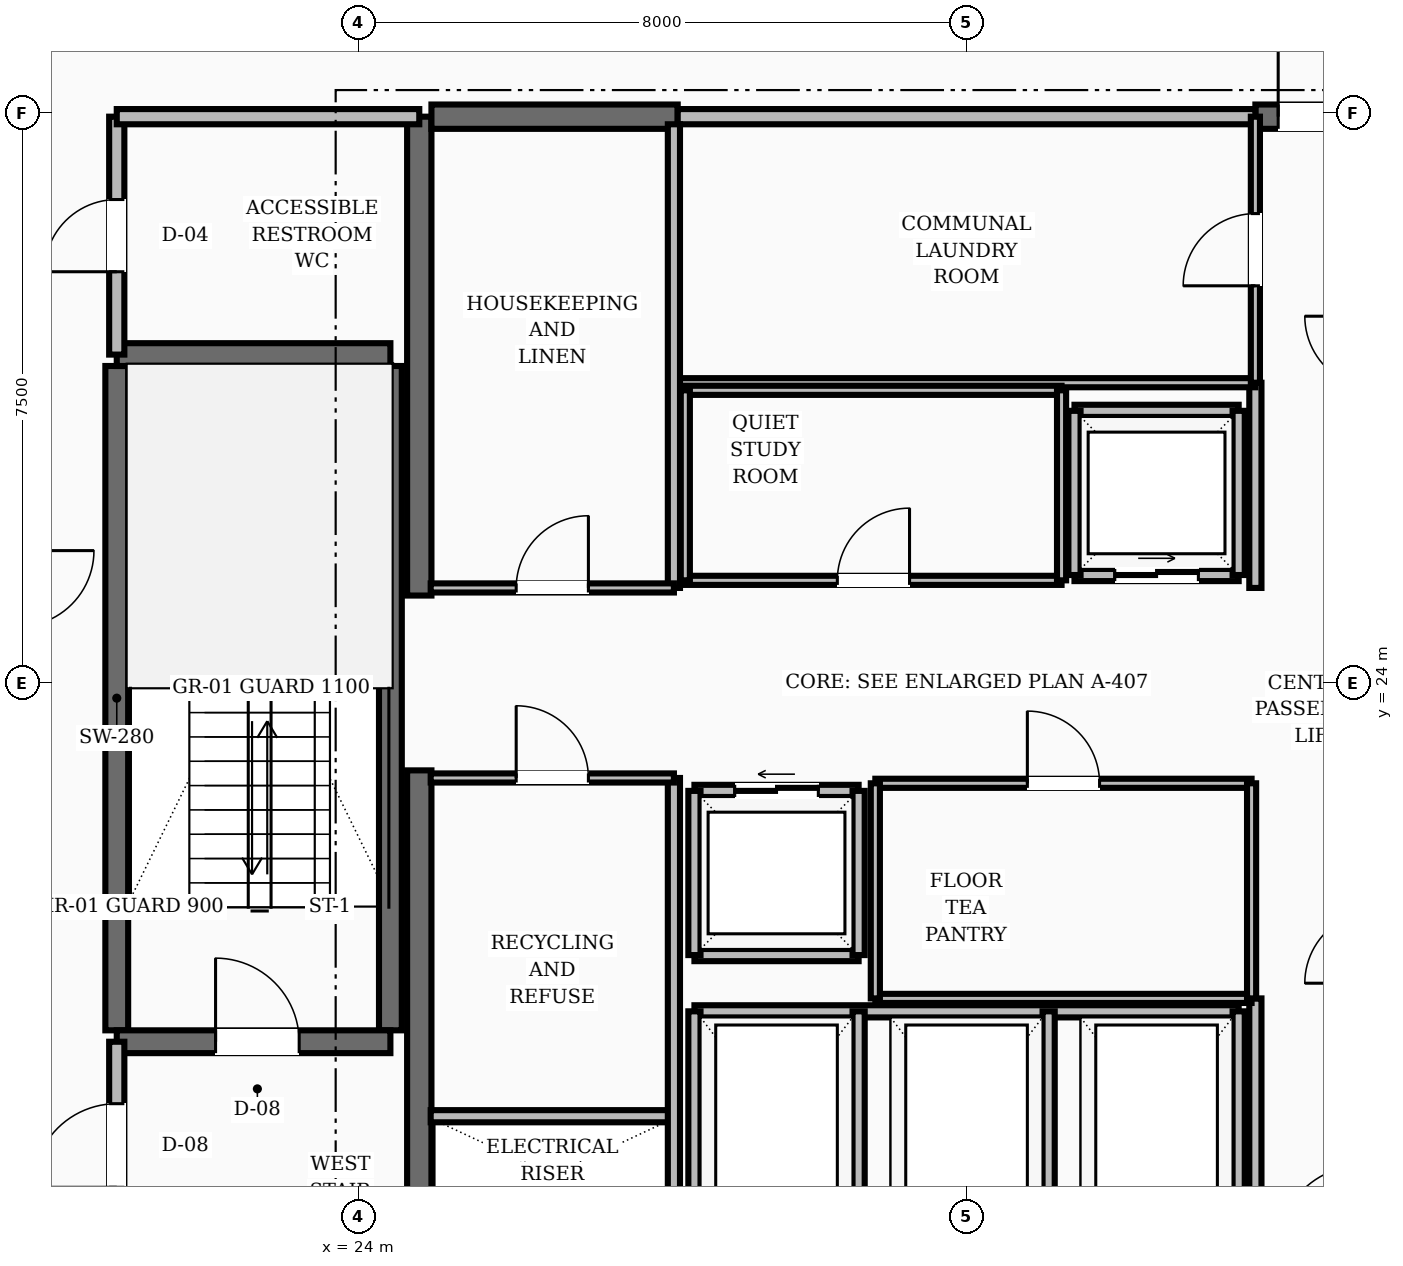
"""IFC4 building model, lengths in metres.
Left out: names, types, materials, properties, quantities, classifications, styles, units other than length and angle.
Written with IfcOpenShell. Run it as: python <this file> out.ifc"""

import sys

from ifc_helpers import new_model, si_unit, direction, frame, frame_2d, origin, place, context, subcontext, project, spatial, rectangle, extrude, element, fill, save


model = new_model("IFC4")
c1 = context("Model", 3, precision=1e-05, world=origin(), true_north=direction((0.0, 1.0)))
c2 = subcontext(c1, "Body", "Model", "MODEL_VIEW")
j1 = project(units=[si_unit("LENGTHUNIT", "METRE"), si_unit("PLANEANGLEUNIT", "RADIAN")], contexts=[c1])
p1 = place(None, origin())
s1 = spatial("IfcSite", under=j1, at=p1, CompositionType="ELEMENT")
p2 = place(p1, origin())
s2 = spatial("IfcBuilding", under=s1, at=p2, CompositionType="ELEMENT")
p3 = place(p2, frame((0.0, 0.0, 232.8)))
s3 = spatial("IfcBuildingStorey", under=s2, at=p3, CompositionType="ELEMENT", Elevation=232.8)
for number, where, z_axis, x_axis in (
    (1, (24.8, 16.55, 0.0), (0.0, 0.0, 1.0), (0.0, 1.0, 0.0)),
    (2, (24.8, 25.15, 0.0), (0.0, 0.0, 1.0), (0.0, 1.0, 0.0)),
):
    element("IfcWall", number, at=place(p3, frame(where, z_axis=z_axis, x_axis=x_axis)), inside=s3, PredefinedType="SHEAR", context=c2, shape_type="SweptSolid", body=[
        extrude(rectangle(XDim=6.3, YDim=0.32, at=frame_2d((3.15, 0.0))), origin(), (0.0, 0.0, 1.0), 3.6),
    ])
p4 = place(p3, frame((24.96, 31.45, 0.0), z_axis=(0.0, 0.0, 1.0), x_axis=(1.0, 0.0, 0.0)))
e3 = element("IfcWall", 3, at=p4, inside=s3, PredefinedType="SHEAR", context=c2, shape_type="SweptSolid", body=[
    extrude(rectangle(XDim=3.24, YDim=0.32, at=frame_2d((1.62, 0.0))), origin(), (0.0, 0.0, 1.0), 3.6),
])
p5 = place(p3, frame((35.8, 31.45, 0.0), z_axis=(0.0, 0.0, 1.0), x_axis=(1.0, 0.0, 0.0)))
e4 = element("IfcWall", 4, at=p5, inside=s3, PredefinedType="SHEAR", context=c2, shape_type="SweptSolid", body=[
    extrude(rectangle(XDim=3.24, YDim=0.32, at=frame_2d((1.62, 0.0))), origin(), (0.0, 0.0, 1.0), 3.6),
])
p6 = place(p5, frame((0.3, 0.0, 0.0)))
e5 = element("IfcOpeningElement", 5, at=p6, cuts=e4, PredefinedType="OPENING", context=c2, shape_type="SweptSolid", body=[
    extrude(rectangle(XDim=1.1, YDim=2.1, at=frame_2d((0.55, 1.05))), frame((0.0, 0.17, 0.0), z_axis=(0.0, -1.0, 0.0), x_axis=(1.0, 0.0, 0.0)), (0.0, 0.0, 1.0), 0.34),
])
for number, where, z_axis, x_axis in (
    (6, (20.82, 19.43, 0.0), (0.0, 0.0, 1.0), (0.0, 1.0, 0.0)),
    (7, (24.42, 19.43, 0.0), (0.0, 0.0, 1.0), (0.0, 1.0, 0.0)),
):
    element("IfcWall", number, at=place(p3, frame(where, z_axis=z_axis, x_axis=x_axis)), inside=s3, PredefinedType="SHEAR", context=c2, shape_type="SweptSolid", body=[
        extrude(rectangle(XDim=8.74, YDim=0.3, at=frame_2d((4.37, 0.0))), origin(), (0.0, 0.0, 1.0), 3.6),
    ])
p7 = place(p3, frame((20.82, 19.28, 0.0), z_axis=(0.0, 0.0, 1.0), x_axis=(1.0, 0.0, 0.0)))
e8 = element("IfcWall", 8, at=p7, inside=s3, PredefinedType="SHEAR", context=c2, shape_type="SweptSolid", body=[
    extrude(rectangle(XDim=3.6, YDim=0.3, at=frame_2d((1.8, 0.0))), origin(), (0.0, 0.0, 1.0), 3.6),
])
p8 = place(p7, frame((1.3, 0.0, 0.0)))
e9 = element("IfcOpeningElement", 9, at=p8, cuts=e8, PredefinedType="OPENING", context=c2, shape_type="SweptSolid", body=[
    extrude(rectangle(XDim=1.1, YDim=2.1, at=frame_2d((0.55, 1.05))), frame((0.0, 0.16, 0.0), z_axis=(0.0, -1.0, 0.0), x_axis=(1.0, 0.0, 0.0)), (0.0, 0.0, 1.0), 0.32),
])
p9 = place(p3, frame((20.82, 28.32, 0.0), z_axis=(0.0, 0.0, 1.0), x_axis=(1.0, 0.0, 0.0)))
e10 = element("IfcWall", 10, at=p9, inside=s3, PredefinedType="SHEAR", context=c2, shape_type="SweptSolid", body=[
    extrude(rectangle(XDim=3.6, YDim=0.3, at=frame_2d((1.8, 0.0))), origin(), (0.0, 0.0, 1.0), 3.6),
])
p10 = place(p3, frame((20.82, 16.55, 0.0), z_axis=(0.0, 0.0, 1.0), x_axis=(0.0, 1.0, 0.0)))
e11 = element("IfcWall", 11, at=p10, inside=s3, PredefinedType="SOLIDWALL", context=c2, shape_type="SweptSolid", body=[
    extrude(rectangle(XDim=2.73, YDim=0.2, at=frame_2d((1.365, 0.0))), origin(), (0.0, 0.0, 1.0), 2.87),
])
p11 = place(p10, frame((0.815, 0.0, 0.0)))
e12 = element("IfcOpeningElement", 12, at=p11, cuts=e11, PredefinedType="OPENING", context=c2, shape_type="SweptSolid", body=[
    extrude(rectangle(XDim=1.1, YDim=2.1, at=frame_2d((0.55, 1.05))), frame((0.0, 0.11, 0.0), z_axis=(0.0, -1.0, 0.0), x_axis=(1.0, 0.0, 0.0)), (0.0, 0.0, 1.0), 0.22),
])
p12 = place(p3, frame((20.82, 28.32, 0.0), z_axis=(0.0, 0.0, 1.0), x_axis=(0.0, 1.0, 0.0)))
e13 = element("IfcWall", 13, at=p12, inside=s3, PredefinedType="SOLIDWALL", context=c2, shape_type="SweptSolid", body=[
    extrude(rectangle(XDim=3.13, YDim=0.2, at=frame_2d((1.565, 0.0))), origin(), (0.0, 0.0, 1.0), 2.87),
])
p13 = place(p12, frame((1.09, 0.0, 0.0)))
e14 = element("IfcOpeningElement", 14, at=p13, cuts=e13, PredefinedType="OPENING", context=c2, shape_type="SweptSolid", body=[
    extrude(rectangle(XDim=0.95, YDim=2.1, at=frame_2d((0.475, 1.05))), frame((0.0, 0.11, 0.0), z_axis=(0.0, -1.0, 0.0), x_axis=(1.0, 0.0, 0.0)), (0.0, 0.0, 1.0), 0.22),
])
p14 = place(p3, frame((20.82, 31.45, 0.0), z_axis=(0.0, 0.0, 1.0), x_axis=(1.0, 0.0, 0.0)))
e15 = element("IfcWall", 15, at=p14, inside=s3, PredefinedType="SOLIDWALL", context=c2, shape_type="SweptSolid", body=[
    extrude(rectangle(XDim=3.98, YDim=0.2, at=frame_2d((1.99, 0.0))), origin(), (0.0, 0.0, 1.0), 2.87),
])
p15 = place(p3, frame((35.8, 16.55, 0.0), z_axis=(0.0, 0.0, 1.0), x_axis=(0.0, 1.0, 0.0)))
e16 = element("IfcWall", 16, at=p15, inside=s3, PredefinedType="SOLIDWALL", context=c2, shape_type="SweptSolid", body=[
    extrude(rectangle(XDim=3.3, YDim=0.16, at=frame_2d((1.65, 0.0))), origin(), (0.0, 0.0, 1.0), 2.87),
])
p16 = place(p3, frame((35.8, 25.25, 0.0), z_axis=(0.0, 0.0, 1.0), x_axis=(0.0, 1.0, 0.0)))
e17 = element("IfcWall", 17, at=p16, inside=s3, PredefinedType="SOLIDWALL", context=c2, shape_type="SweptSolid", body=[
    extrude(rectangle(XDim=2.7, YDim=0.16, at=frame_2d((1.35, 0.0))), origin(), (0.0, 0.0, 1.0), 2.87),
])
p17 = place(p3, frame((33.42, 25.42, 0.0), z_axis=(0.0, 0.0, 1.0), x_axis=(1.0, 0.0, 0.0)))
e18 = element("IfcWall", 18, at=p17, inside=s3, PredefinedType="SOLIDWALL", context=c2, shape_type="SweptSolid", body=[
    extrude(rectangle(XDim=2.16, YDim=0.16, at=frame_2d((1.08, 0.0))), origin(), (0.0, 0.0, 1.0), 2.87),
])
p18 = place(p17, frame((0.53, 0.0, 0.0)))
e19 = element("IfcOpeningElement", 19, at=p18, cuts=e18, PredefinedType="OPENING", context=c2, shape_type="SweptSolid", body=[
    extrude(rectangle(XDim=1.1, YDim=2.15, at=frame_2d((0.55, 1.075))), frame((0.0, 0.09, 0.0), z_axis=(0.0, -1.0, 0.0), x_axis=(1.0, 0.0, 0.0)), (0.0, 0.0, 1.0), 0.18),
])
for number, where, z_axis, x_axis in (
    (20, (33.42, 27.58, 0.0), (0.0, 0.0, 1.0), (1.0, 0.0, 0.0)),
    (21, (33.42, 25.42, 0.0), (0.0, 0.0, 1.0), (0.0, 1.0, 0.0)),
    (22, (35.58, 25.42, 0.0), (0.0, 0.0, 1.0), (0.0, 1.0, 0.0)),
):
    element("IfcWall", number, at=place(p3, frame(where, z_axis=z_axis, x_axis=x_axis)), inside=s3, PredefinedType="SOLIDWALL", context=c2, shape_type="SweptSolid", body=[
        extrude(rectangle(XDim=2.16, YDim=0.16, at=frame_2d((1.08, 0.0))), origin(), (0.0, 0.0, 1.0), 2.87),
    ])
p19 = place(p3, frame((28.42, 22.58, 0.0), z_axis=(0.0, 0.0, 1.0), x_axis=(1.0, 0.0, 0.0)))
e23 = element("IfcWall", 23, at=p19, inside=s3, PredefinedType="SOLIDWALL", context=c2, shape_type="SweptSolid", body=[
    extrude(rectangle(XDim=2.16, YDim=0.16, at=frame_2d((1.08, 0.0))), origin(), (0.0, 0.0, 1.0), 2.87),
])
p20 = place(p19, frame((0.53, 0.0, 0.0)))
e24 = element("IfcOpeningElement", 24, at=p20, cuts=e23, PredefinedType="OPENING", context=c2, shape_type="SweptSolid", body=[
    extrude(rectangle(XDim=1.1, YDim=2.15, at=frame_2d((0.55, 1.075))), frame((0.0, 0.09, 0.0), z_axis=(0.0, -1.0, 0.0), x_axis=(1.0, 0.0, 0.0)), (0.0, 0.0, 1.0), 0.18),
])
for number, where, z_axis, x_axis in (
    (25, (28.42, 20.42, 0.0), (0.0, 0.0, 1.0), (1.0, 0.0, 0.0)),
    (26, (28.42, 20.42, 0.0), (0.0, 0.0, 1.0), (0.0, 1.0, 0.0)),
    (27, (30.58, 20.42, 0.0), (0.0, 0.0, 1.0), (0.0, 1.0, 0.0)),
):
    element("IfcWall", number, at=place(p3, frame(where, z_axis=z_axis, x_axis=x_axis)), inside=s3, PredefinedType="SOLIDWALL", context=c2, shape_type="SweptSolid", body=[
        extrude(rectangle(XDim=2.16, YDim=0.16, at=frame_2d((1.08, 0.0))), origin(), (0.0, 0.0, 1.0), 2.87),
    ])
p21 = place(p3, frame((28.42, 19.68, 0.0), z_axis=(0.0, 0.0, 1.0), x_axis=(1.0, 0.0, 0.0)))
e28 = element("IfcWall", 28, at=p21, inside=s3, PredefinedType="SOLIDWALL", context=c2, shape_type="SweptSolid", body=[
    extrude(rectangle(XDim=7.16, YDim=0.16, at=frame_2d((3.58, 0.0))), origin(), (0.0, 0.0, 1.0), 2.87),
])
for number, where, z_axis, x_axis in (
    (29, (28.42, 16.92, 0.0), (0.0, 0.0, 1.0), (0.0, 1.0, 0.0)),
    (30, (30.58, 16.92, 0.0), (0.0, 0.0, 1.0), (0.0, 1.0, 0.0)),
    (31, (33.08, 16.92, 0.0), (0.0, 0.0, 1.0), (0.0, 1.0, 0.0)),
    (32, (35.58, 16.92, 0.0), (0.0, 0.0, 1.0), (0.0, 1.0, 0.0)),
):
    element("IfcWall", number, at=place(p3, frame(where, z_axis=z_axis, x_axis=x_axis)), inside=s3, PredefinedType="SOLIDWALL", context=c2, shape_type="SweptSolid", body=[
        extrude(rectangle(XDim=2.76, YDim=0.16, at=frame_2d((1.38, 0.0))), origin(), (0.0, 0.0, 1.0), 2.87),
    ])
p22 = place(p3, frame((28.2, 31.45, 0.0), z_axis=(0.0, 0.0, 1.0), x_axis=(1.0, 0.0, 0.0)))
e33 = element("IfcWall", 33, at=p22, inside=s3, PredefinedType="SOLIDWALL", context=c2, shape_type="SweptSolid", body=[
    extrude(rectangle(XDim=7.6, YDim=0.2, at=frame_2d((3.8, 0.0))), origin(), (0.0, 0.0, 1.0), 2.87),
])
p23 = place(p3, frame((28.2, 27.95, 0.0), z_axis=(0.0, 0.0, 1.0), x_axis=(1.0, 0.0, 0.0)))
e34 = element("IfcWall", 34, at=p23, inside=s3, PredefinedType="PARTITIONING", context=c2, shape_type="SweptSolid", body=[
    extrude(rectangle(XDim=7.6, YDim=0.12, at=frame_2d((3.8, 0.0))), origin(), (0.0, 0.0, 1.0), 2.87),
])
p24 = place(p3, frame((35.8, 27.95, 0.0), z_axis=(0.0, 0.0, 1.0), x_axis=(0.0, 1.0, 0.0)))
e35 = element("IfcWall", 35, at=p24, inside=s3, PredefinedType="PARTITIONING", context=c2, shape_type="SweptSolid", body=[
    extrude(rectangle(XDim=3.5, YDim=0.12, at=frame_2d((1.75, 0.0))), origin(), (0.0, 0.0, 1.0), 2.87),
])
p25 = place(p24, frame((1.275, 0.0, 0.0)))
e36 = element("IfcOpeningElement", 36, at=p25, cuts=e35, PredefinedType="OPENING", context=c2, shape_type="SweptSolid", body=[
    extrude(rectangle(XDim=0.95, YDim=2.1, at=frame_2d((0.475, 1.05))), frame((0.0, 0.07, 0.0), z_axis=(0.0, -1.0, 0.0), x_axis=(1.0, 0.0, 0.0)), (0.0, 0.0, 1.0), 0.14),
])
p26 = place(p3, frame((28.3, 25.35, 0.0), z_axis=(0.0, 0.0, 1.0), x_axis=(1.0, 0.0, 0.0)))
e37 = element("IfcWall", 37, at=p26, inside=s3, PredefinedType="PARTITIONING", context=c2, shape_type="SweptSolid", body=[
    extrude(rectangle(XDim=4.95, YDim=0.12, at=frame_2d((2.475, 0.0))), origin(), (0.0, 0.0, 1.0), 2.87),
])
p27 = place(p26, frame((2.0, 0.0, 0.0)))
e38 = element("IfcOpeningElement", 38, at=p27, cuts=e37, PredefinedType="OPENING", context=c2, shape_type="SweptSolid", body=[
    extrude(rectangle(XDim=0.95, YDim=2.1, at=frame_2d((0.475, 1.05))), frame((0.0, 0.07, 0.0), z_axis=(0.0, -1.0, 0.0), x_axis=(1.0, 0.0, 0.0)), (0.0, 0.0, 1.0), 0.14),
])
p28 = place(p3, frame((28.3, 27.85, 0.0), z_axis=(0.0, 0.0, 1.0), x_axis=(1.0, 0.0, 0.0)))
e39 = element("IfcWall", 39, at=p28, inside=s3, PredefinedType="PARTITIONING", context=c2, shape_type="SweptSolid", body=[
    extrude(rectangle(XDim=4.95, YDim=0.12, at=frame_2d((2.475, 0.0))), origin(), (0.0, 0.0, 1.0), 2.87),
])
for number, where, z_axis, x_axis in (
    (40, (28.3, 25.35, 0.0), (0.0, 0.0, 1.0), (0.0, 1.0, 0.0)),
    (41, (33.25, 25.35, 0.0), (0.0, 0.0, 1.0), (0.0, 1.0, 0.0)),
):
    element("IfcWall", number, at=place(p3, frame(where, z_axis=z_axis, x_axis=x_axis)), inside=s3, PredefinedType="PARTITIONING", context=c2, shape_type="SweptSolid", body=[
        extrude(rectangle(XDim=2.5, YDim=0.12, at=frame_2d((1.25, 0.0))), origin(), (0.0, 0.0, 1.0), 2.87),
    ])
p29 = place(p3, frame((30.8, 22.68, 0.0), z_axis=(0.0, 0.0, 1.0), x_axis=(1.0, 0.0, 0.0)))
e42 = element("IfcWall", 42, at=p29, inside=s3, PredefinedType="PARTITIONING", context=c2, shape_type="SweptSolid", body=[
    extrude(rectangle(XDim=4.95, YDim=0.12, at=frame_2d((2.475, 0.0))), origin(), (0.0, 0.0, 1.0), 2.87),
])
p30 = place(p29, frame((2.0, 0.0, 0.0)))
e43 = element("IfcOpeningElement", 43, at=p30, cuts=e42, PredefinedType="OPENING", context=c2, shape_type="SweptSolid", body=[
    extrude(rectangle(XDim=0.95, YDim=2.1, at=frame_2d((0.475, 1.05))), frame((0.0, 0.07, 0.0), z_axis=(0.0, -1.0, 0.0), x_axis=(1.0, 0.0, 0.0)), (0.0, 0.0, 1.0), 0.14),
])
p31 = place(p3, frame((30.8, 19.85, 0.0), z_axis=(0.0, 0.0, 1.0), x_axis=(1.0, 0.0, 0.0)))
e44 = element("IfcWall", 44, at=p31, inside=s3, PredefinedType="PARTITIONING", context=c2, shape_type="SweptSolid", body=[
    extrude(rectangle(XDim=4.95, YDim=0.12, at=frame_2d((2.475, 0.0))), origin(), (0.0, 0.0, 1.0), 2.87),
])
for number, where, z_axis, x_axis in (
    (45, (30.8, 19.85, 0.0), (0.0, 0.0, 1.0), (0.0, 1.0, 0.0)),
    (46, (35.75, 19.85, 0.0), (0.0, 0.0, 1.0), (0.0, 1.0, 0.0)),
):
    element("IfcWall", number, at=place(p3, frame(where, z_axis=z_axis, x_axis=x_axis)), inside=s3, PredefinedType="PARTITIONING", context=c2, shape_type="SweptSolid", body=[
        extrude(rectangle(XDim=2.83, YDim=0.12, at=frame_2d((1.415, 0.0))), origin(), (0.0, 0.0, 1.0), 2.87),
    ])
p32 = place(p3, frame((24.95, 18.3, 0.0), z_axis=(0.0, 0.0, 1.0), x_axis=(1.0, 0.0, 0.0)))
e47 = element("IfcWall", 47, at=p32, inside=s3, PredefinedType="SOLIDWALL", context=c2, shape_type="SweptSolid", body=[
    extrude(rectangle(XDim=3.2, YDim=0.16, at=frame_2d((1.6, 0.0))), origin(), (0.0, 0.0, 1.0), 2.87),
])
p33 = place(p3, frame((28.15, 16.7, 0.0), z_axis=(0.0, 0.0, 1.0), x_axis=(0.0, 1.0, 0.0)))
e48 = element("IfcWall", 48, at=p33, inside=s3, PredefinedType="SOLIDWALL", context=c2, shape_type="SweptSolid", body=[
    extrude(rectangle(XDim=6.05, YDim=0.16, at=frame_2d((3.025, 0.0))), origin(), (0.0, 0.0, 1.0), 2.87),
])
p34 = place(p3, frame((28.15, 25.25, 0.0), z_axis=(0.0, 0.0, 1.0), x_axis=(0.0, 1.0, 0.0)))
e49 = element("IfcWall", 49, at=p34, inside=s3, PredefinedType="SOLIDWALL", context=c2, shape_type="SweptSolid", body=[
    extrude(rectangle(XDim=6.1, YDim=0.16, at=frame_2d((3.05, 0.0))), origin(), (0.0, 0.0, 1.0), 2.87),
])
p35 = place(p3, frame((24.95, 25.25, 0.0), z_axis=(0.0, 0.0, 1.0), x_axis=(1.0, 0.0, 0.0)))
e50 = element("IfcWall", 50, at=p35, inside=s3, PredefinedType="PARTITIONING", context=c2, shape_type="SweptSolid", body=[
    extrude(rectangle(XDim=3.2, YDim=0.12, at=frame_2d((1.6, 0.0))), origin(), (0.0, 0.0, 1.0), 2.87),
])
p36 = place(p35, frame((1.125, 0.0, 0.0)))
e51 = element("IfcOpeningElement", 51, at=p36, cuts=e50, PredefinedType="OPENING", context=c2, shape_type="SweptSolid", body=[
    extrude(rectangle(XDim=0.95, YDim=2.1, at=frame_2d((0.475, 1.05))), frame((0.0, 0.07, 0.0), z_axis=(0.0, -1.0, 0.0), x_axis=(1.0, 0.0, 0.0)), (0.0, 0.0, 1.0), 0.14),
])
p37 = place(p3, frame((24.95, 22.75, 0.0), z_axis=(0.0, 0.0, 1.0), x_axis=(1.0, 0.0, 0.0)))
e52 = element("IfcWall", 52, at=p37, inside=s3, PredefinedType="PARTITIONING", context=c2, shape_type="SweptSolid", body=[
    extrude(rectangle(XDim=3.2, YDim=0.12, at=frame_2d((1.6, 0.0))), origin(), (0.0, 0.0, 1.0), 2.87),
])
p38 = place(p37, frame((1.125, 0.0, 0.0)))
e53 = element("IfcOpeningElement", 53, at=p38, cuts=e52, PredefinedType="OPENING", context=c2, shape_type="SweptSolid", body=[
    extrude(rectangle(XDim=0.95, YDim=2.1, at=frame_2d((0.475, 1.05))), frame((0.0, 0.07, 0.0), z_axis=(0.0, -1.0, 0.0), x_axis=(1.0, 0.0, 0.0)), (0.0, 0.0, 1.0), 0.14),
])
p39 = place(p3, frame((21.635, 34.365, 0.0), z_axis=(0.0, 0.0, 1.0), x_axis=(-0.707106781187, -0.707106781187, 0.0)))
e54 = element("IfcWall", 54, at=p39, inside=s3, PredefinedType="SOLIDWALL", context=c2, shape_type="SweptSolid", body=[
    extrude(rectangle(XDim=2.916, YDim=0.16, at=frame_2d((1.458, 0.0))), origin(), (0.0, 0.0, 1.0), 2.87),
])
p40 = place(p8, origin())
e55 = element("IfcDoor", 55, at=p40, inside=s3, OperationType="SINGLE_SWING_LEFT", PredefinedType="DOOR", context=c2, shape_type="SweptSolid", body=[
    extrude(rectangle(XDim=1.1, YDim=2.1, at=frame_2d((0.55, 1.05))), frame((0.0, 0.025, 0.0), z_axis=(0.0, -1.0, 0.0), x_axis=(1.0, 0.0, 0.0)), (0.0, 0.0, 1.0), 0.05),
])
fill(e9, e55)
p41 = place(p11, origin())
e56 = element("IfcDoor", 56, at=p41, inside=s3, OperationType="SINGLE_SWING_LEFT", PredefinedType="DOOR", context=c2, shape_type="SweptSolid", body=[
    extrude(rectangle(XDim=1.1, YDim=2.1, at=frame_2d((0.55, 1.05))), frame((0.0, 0.025, 0.0), z_axis=(0.0, -1.0, 0.0), x_axis=(1.0, 0.0, 0.0)), (0.0, 0.0, 1.0), 0.05),
])
fill(e12, e56)
p42 = place(p13, origin())
e57 = element("IfcDoor", 57, at=p42, inside=s3, OperationType="SINGLE_SWING_LEFT", PredefinedType="DOOR", context=c2, shape_type="SweptSolid", body=[
    extrude(rectangle(XDim=0.95, YDim=2.1, at=frame_2d((0.475, 1.05))), frame((0.0, 0.025, 0.0), z_axis=(0.0, -1.0, 0.0), x_axis=(1.0, 0.0, 0.0)), (0.0, 0.0, 1.0), 0.05),
])
fill(e14, e57)
p43 = place(p6, origin())
e58 = element("IfcDoor", 58, at=p43, inside=s3, OperationType="SINGLE_SWING_LEFT", PredefinedType="DOOR", context=c2, shape_type="SweptSolid", body=[
    extrude(rectangle(XDim=1.1, YDim=2.1, at=frame_2d((0.55, 1.05))), frame((0.0, 0.025, 0.0), z_axis=(0.0, -1.0, 0.0), x_axis=(1.0, 0.0, 0.0)), (0.0, 0.0, 1.0), 0.05),
])
fill(e5, e58)
p44 = place(p18, origin())
e59 = element("IfcDoor", 59, at=p44, inside=s3, OperationType="SLIDING_TO_RIGHT", PredefinedType="DOOR", context=c2, shape_type="SweptSolid", body=[
    extrude(rectangle(XDim=1.1, YDim=2.15, at=frame_2d((0.55, 1.075))), frame((0.0, 0.025, 0.0), z_axis=(0.0, -1.0, 0.0), x_axis=(1.0, 0.0, 0.0)), (0.0, 0.0, 1.0), 0.05),
])
fill(e19, e59)
p45 = place(p20, origin())
e60 = element("IfcDoor", 60, at=p45, inside=s3, OperationType="SLIDING_TO_LEFT", PredefinedType="DOOR", context=c2, shape_type="SweptSolid", body=[
    extrude(rectangle(XDim=1.1, YDim=2.15, at=frame_2d((0.55, 1.075))), frame((0.0, 0.025, 0.0), z_axis=(0.0, -1.0, 0.0), x_axis=(1.0, 0.0, 0.0)), (0.0, 0.0, 1.0), 0.05),
])
fill(e24, e60)
p46 = place(p25, origin())
e61 = element("IfcDoor", 61, at=p46, inside=s3, OperationType="SINGLE_SWING_LEFT", PredefinedType="DOOR", context=c2, shape_type="SweptSolid", body=[
    extrude(rectangle(XDim=0.95, YDim=2.1, at=frame_2d((0.475, 1.05))), frame((0.0, 0.025, 0.0), z_axis=(0.0, -1.0, 0.0), x_axis=(1.0, 0.0, 0.0)), (0.0, 0.0, 1.0), 0.05),
])
fill(e36, e61)
p47 = place(p27, origin())
e62 = element("IfcDoor", 62, at=p47, inside=s3, OperationType="SINGLE_SWING_RIGHT", PredefinedType="DOOR", context=c2, shape_type="SweptSolid", body=[
    extrude(rectangle(XDim=0.95, YDim=2.1, at=frame_2d((0.475, 1.05))), frame((0.0, 0.025, 0.0), z_axis=(0.0, -1.0, 0.0), x_axis=(1.0, 0.0, 0.0)), (0.0, 0.0, 1.0), 0.05),
])
fill(e38, e62)
p48 = place(p30, origin())
e63 = element("IfcDoor", 63, at=p48, inside=s3, OperationType="SINGLE_SWING_LEFT", PredefinedType="DOOR", context=c2, shape_type="SweptSolid", body=[
    extrude(rectangle(XDim=0.95, YDim=2.1, at=frame_2d((0.475, 1.05))), frame((0.0, 0.025, 0.0), z_axis=(0.0, -1.0, 0.0), x_axis=(1.0, 0.0, 0.0)), (0.0, 0.0, 1.0), 0.05),
])
fill(e43, e63)
p49 = place(p36, origin())
e64 = element("IfcDoor", 64, at=p49, inside=s3, OperationType="SINGLE_SWING_RIGHT", PredefinedType="DOOR", context=c2, shape_type="SweptSolid", body=[
    extrude(rectangle(XDim=0.95, YDim=2.1, at=frame_2d((0.475, 1.05))), frame((0.0, 0.025, 0.0), z_axis=(0.0, -1.0, 0.0), x_axis=(1.0, 0.0, 0.0)), (0.0, 0.0, 1.0), 0.05),
])
fill(e51, e64)
p50 = place(p38, origin())
e65 = element("IfcDoor", 65, at=p50, inside=s3, OperationType="SINGLE_SWING_LEFT", PredefinedType="DOOR", context=c2, shape_type="SweptSolid", body=[
    extrude(rectangle(XDim=0.95, YDim=2.1, at=frame_2d((0.475, 1.05))), frame((0.0, 0.025, 0.0), z_axis=(0.0, -1.0, 0.0), x_axis=(1.0, 0.0, 0.0)), (0.0, 0.0, 1.0), 0.05),
])
fill(e53, e65)
save(model, sys.argv[1])
